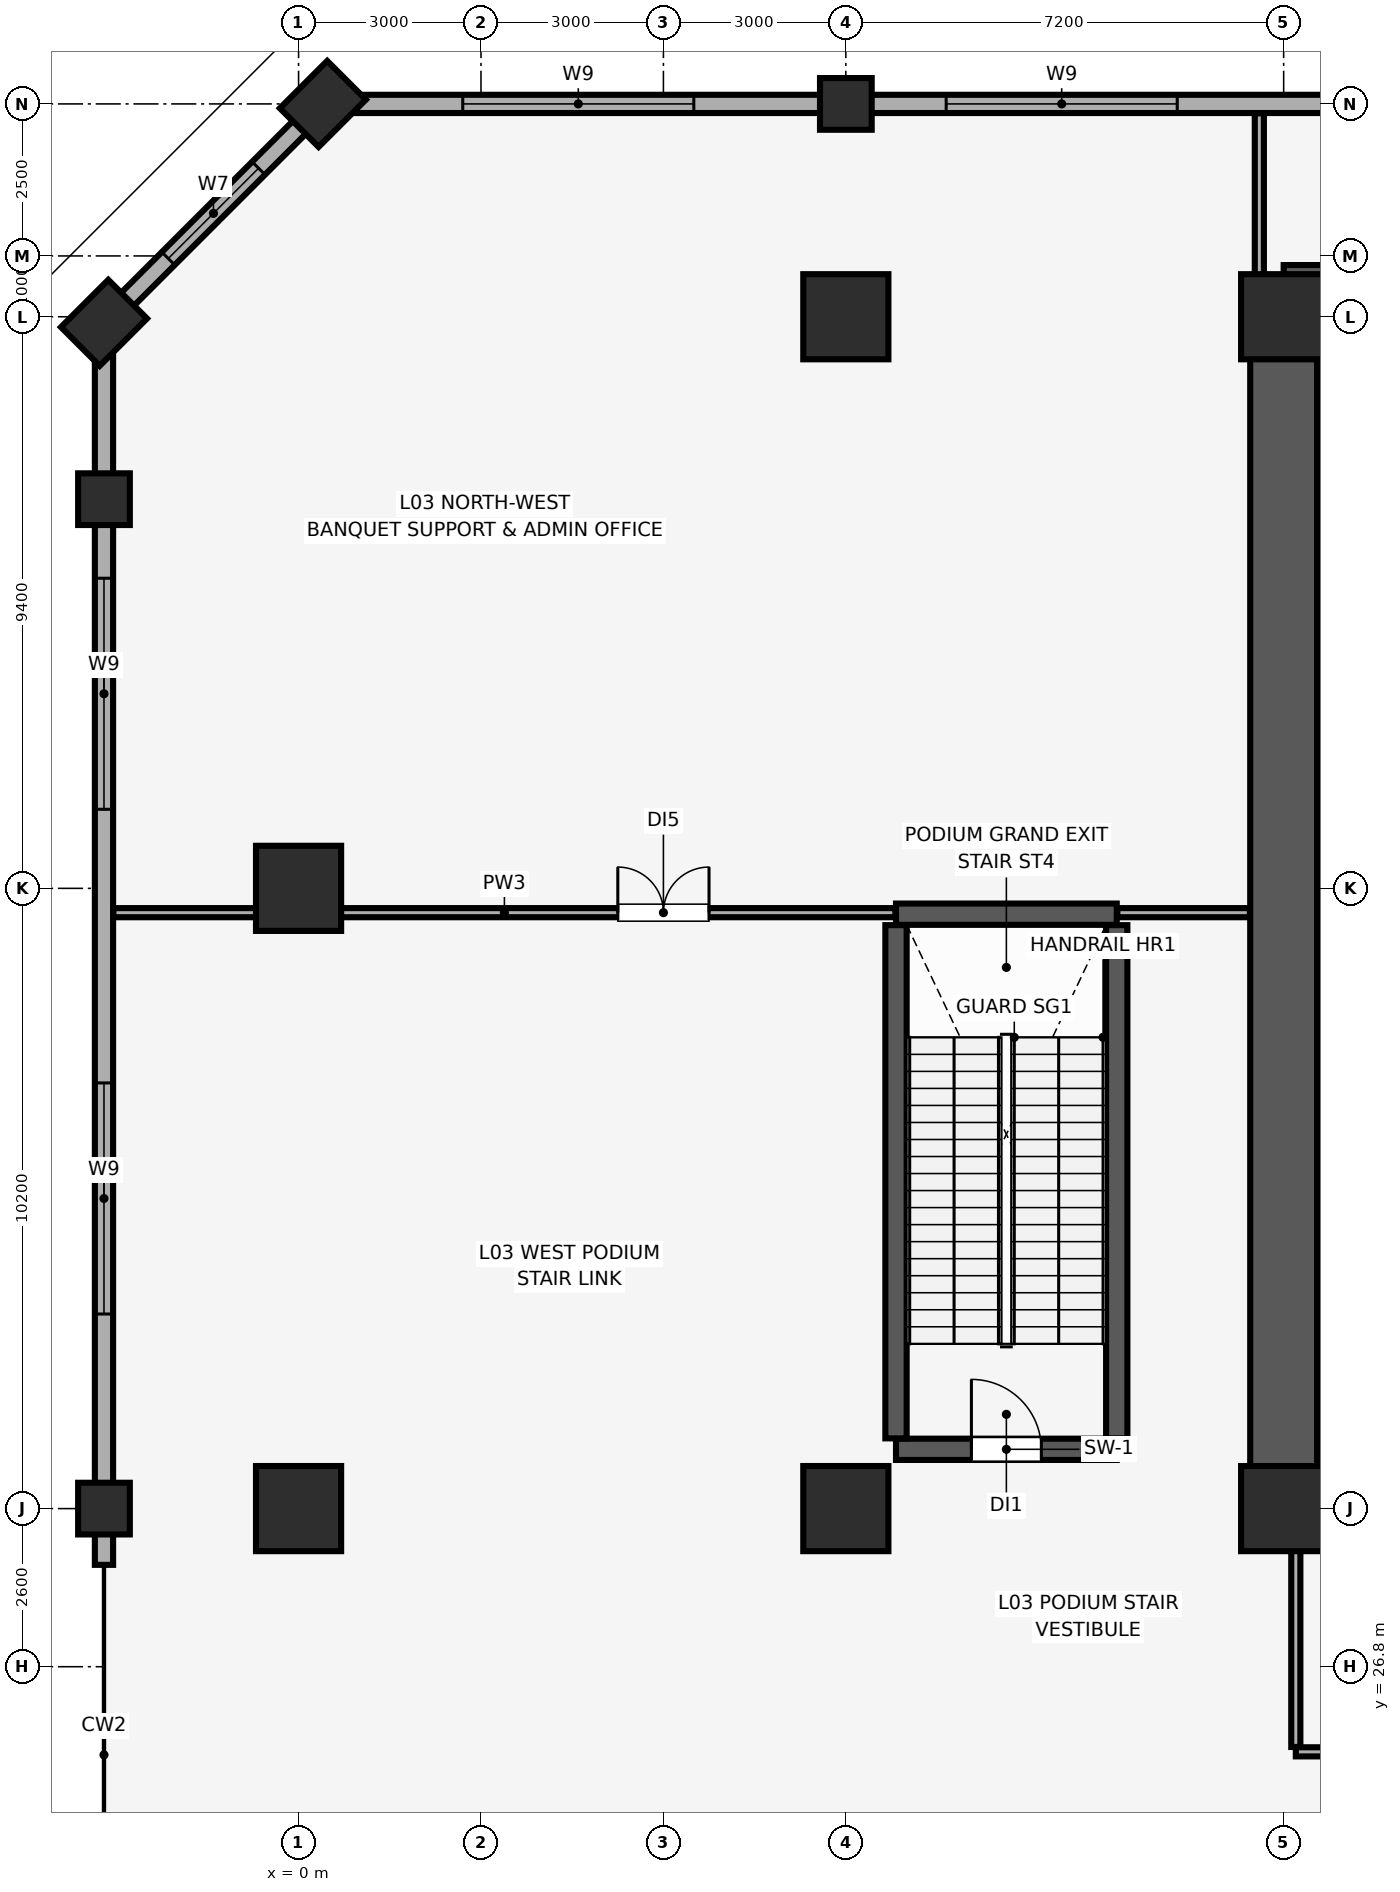
"""IFC4 building model, lengths in metres.
Left out: names, types, materials, properties, quantities, classifications, styles, units other than length and angle.
Written with IfcOpenShell. Run it as: python <this file> out.ifc"""

import sys

from ifc_helpers import new_model, si_unit, direction, frame, frame_2d, origin, origin_2d, place, context, subcontext, project, spatial, rectangle, extrude, element, fill, save


model = new_model("IFC4")
c1 = context("Model", 3, precision=1e-05, world=origin(), true_north=direction((0.0, 1.0)))
c2 = subcontext(c1, "Body", "Model", "MODEL_VIEW")
j1 = project(units=[si_unit("LENGTHUNIT", "METRE"), si_unit("PLANEANGLEUNIT", "RADIAN")], contexts=[c1])
p1 = place(None, origin())
s1 = spatial("IfcSite", under=j1, at=p1, CompositionType="ELEMENT")
p2 = place(p1, origin())
s2 = spatial("IfcBuilding", under=s1, at=p2, CompositionType="ELEMENT")
p3 = place(p2, frame((0.0, 0.0, 19.4)))
s3 = spatial("IfcBuildingStorey", under=s2, at=p3, CompositionType="ELEMENT", Elevation=19.4)
for number, where, z_axis, x_axis in (
    (1, (9.0, 52.5, 0.0), (0.0, 0.0, 1.0), (1.0, 0.0, 0.0)),
    (2, (-3.2, 29.4, 0.0), (0.0, 0.0, 1.0), (1.0, 0.0, 0.0)),
    (3, (-3.2, 46.0, 0.0), (0.0, 0.0, 1.0), (1.0, 0.0, 0.0)),
):
    element("IfcColumn", number, at=place(p3, frame(where, z_axis=z_axis, x_axis=x_axis)), inside=s3, PredefinedType="COLUMN", context=c2, shape_type="SweptSolid", body=[
        extrude(rectangle(XDim=0.85, YDim=0.85, at=origin_2d()), origin(), (0.0, 0.0, 1.0), 6.28),
    ])
for number, where, z_axis, x_axis in (
    (4, (0.4, 52.5, 0.0), (0.0, 0.0, 1.0), (0.707, 0.707, 0.0)),
    (5, (-3.2, 48.9, 0.0), (0.0, 0.0, 1.0), (0.707, 0.707, 0.0)),
):
    element("IfcColumn", number, at=place(p3, frame(where, z_axis=z_axis, x_axis=x_axis)), inside=s3, PredefinedType="PILASTER", context=c2, shape_type="SweptSolid", body=[
        extrude(rectangle(XDim=1.1, YDim=0.9, at=origin_2d()), origin(), (0.0, 0.0, 1.0), 6.28),
    ])
for number, where, z_axis, x_axis in (
    (6, (9.0, 29.4, 0.0), (0.0, 0.0, 1.0), (1.0, 0.0, 0.0)),
    (7, (9.0, 49.0, 0.0), (0.0, 0.0, 1.0), (1.0, 0.0, 0.0)),
    (8, (16.2, 29.4, 0.0), (0.0, 0.0, 1.0), (1.0, 0.0, 0.0)),
    (9, (16.2, 49.0, 0.0), (0.0, 0.0, 1.0), (1.0, 0.0, 0.0)),
    (10, (0.0, 29.4, 0.0), (0.0, 0.0, 1.0), (1.0, 0.0, 0.0)),
    (11, (0.0, 39.6, 0.0), (0.0, 0.0, 1.0), (1.0, 0.0, 0.0)),
):
    element("IfcColumn", number, at=place(p3, frame(where, z_axis=z_axis, x_axis=x_axis)), inside=s3, PredefinedType="COLUMN", context=c2, shape_type="SweptSolid", body=[
        extrude(rectangle(XDim=1.4, YDim=1.4, at=origin_2d()), origin(), (0.0, 0.0, 1.0), 6.28),
    ])
p4 = place(p3, frame((83.6, 52.5, 0.0), z_axis=(0.0, 0.0, 1.0), x_axis=(-1.0, 0.0, 0.0)))
e12 = element("IfcWall", 12, at=p4, inside=s3, PredefinedType="SOLIDWALL", context=c2, shape_type="SweptSolid", body=[
    extrude(rectangle(XDim=83.2, YDim=0.3, at=frame_2d((41.6, 0.0))), origin(), (0.0, 0.0, 1.0), 5.33),
])
p5 = place(p4, frame((77.1, 0.0, 0.85)))
e13 = element("IfcOpeningElement", 13, at=p5, cuts=e12, PredefinedType="OPENING", context=c2, shape_type="SweptSolid", body=[
    extrude(rectangle(XDim=3.8, YDim=2.2, at=frame_2d((1.9, 1.1))), frame((0.0, 0.16, 0.0), z_axis=(0.0, -1.0, 0.0), x_axis=(1.0, 0.0, 0.0)), (0.0, 0.0, 1.0), 0.32),
])
p6 = place(p4, frame((69.15, 0.0, 0.85)))
e14 = element("IfcOpeningElement", 14, at=p6, cuts=e12, PredefinedType="OPENING", context=c2, shape_type="SweptSolid", body=[
    extrude(rectangle(XDim=3.8, YDim=2.2, at=frame_2d((1.9, 1.1))), frame((0.0, 0.16, 0.0), z_axis=(0.0, -1.0, 0.0), x_axis=(1.0, 0.0, 0.0)), (0.0, 0.0, 1.0), 0.32),
])
p7 = place(p4, frame((10.1, 0.0, 0.85)))
e15 = element("IfcOpeningElement", 15, at=p7, cuts=e12, PredefinedType="OPENING", context=c2, shape_type="SweptSolid", body=[
    extrude(rectangle(XDim=3.8, YDim=2.2, at=frame_2d((1.9, 1.1))), frame((0.0, 0.16, 0.0), z_axis=(0.0, -1.0, 0.0), x_axis=(1.0, 0.0, 0.0)), (0.0, 0.0, 1.0), 0.32),
])
p8 = place(p4, frame((2.3, 0.0, 0.85)))
e16 = element("IfcOpeningElement", 16, at=p8, cuts=e12, PredefinedType="OPENING", context=c2, shape_type="SweptSolid", body=[
    extrude(rectangle(XDim=3.8, YDim=2.2, at=frame_2d((1.9, 1.1))), frame((0.0, 0.16, 0.0), z_axis=(0.0, -1.0, 0.0), x_axis=(1.0, 0.0, 0.0)), (0.0, 0.0, 1.0), 0.32),
])
p9 = place(p3, frame((0.4, 52.5, 0.0), z_axis=(0.0, 0.0, 1.0), x_axis=(-0.707082803744, -0.707130757816, 0.0)))
e17 = element("IfcWall", 17, at=p9, inside=s3, PredefinedType="SOLIDWALL", context=c2, shape_type="SweptSolid", body=[
    extrude(rectangle(XDim=5.091, YDim=0.3, at=frame_2d((2.545, 0.0))), origin(), (0.0, 0.0, 1.0), 5.33),
])
p10 = place(p9, frame((1.496, 0.0, 0.85)))
e18 = element("IfcOpeningElement", 18, at=p10, cuts=e17, PredefinedType="OPENING", context=c2, shape_type="SweptSolid", body=[
    extrude(rectangle(XDim=2.1, YDim=1.6, at=frame_2d((1.05, 0.8))), frame((0.0, 0.16, 0.0), z_axis=(0.0, -1.0, 0.0), x_axis=(1.0, 0.0, 0.0)), (0.0, 0.0, 1.0), 0.32),
])
p11 = place(p3, frame((-3.2, 48.9, 0.0), z_axis=(0.0, 0.0, 1.0), x_axis=(0.0, -1.0, 0.0)))
e19 = element("IfcWall", 19, at=p11, inside=s3, PredefinedType="SOLIDWALL", context=c2, shape_type="SweptSolid", body=[
    extrude(rectangle(XDim=20.425, YDim=0.3, at=frame_2d((10.212, 0.0))), origin(), (0.0, 0.0, 1.0), 5.33),
])
p12 = place(p11, frame((12.5, 0.0, 0.85)))
e20 = element("IfcOpeningElement", 20, at=p12, cuts=e19, PredefinedType="OPENING", context=c2, shape_type="SweptSolid", body=[
    extrude(rectangle(XDim=3.8, YDim=2.2, at=frame_2d((1.9, 1.1))), frame((0.0, 0.16, 0.0), z_axis=(0.0, -1.0, 0.0), x_axis=(1.0, 0.0, 0.0)), (0.0, 0.0, 1.0), 0.32),
])
p13 = place(p11, frame((4.2, 0.0, 0.85)))
e21 = element("IfcOpeningElement", 21, at=p13, cuts=e19, PredefinedType="OPENING", context=c2, shape_type="SweptSolid", body=[
    extrude(rectangle(XDim=3.8, YDim=2.2, at=frame_2d((1.9, 1.1))), frame((0.0, 0.16, 0.0), z_axis=(0.0, -1.0, 0.0), x_axis=(1.0, 0.0, 0.0)), (0.0, 0.0, 1.0), 0.32),
])
p14 = place(p3, frame((16.2, 49.3, 0.0), z_axis=(0.0, 0.0, 1.0), x_axis=(1.0, 0.0, 0.0)))
e22 = element("IfcWall", 22, at=p14, inside=s3, PredefinedType="SHEAR", context=c2, shape_type="SweptSolid", body=[
    extrude(rectangle(XDim=51.6, YDim=1.1, at=frame_2d((25.8, 0.0))), origin(), (0.0, 0.0, 1.0), 6.28),
])
p15 = place(p3, frame((16.2, 29.4, 0.0), z_axis=(0.0, 0.0, 1.0), x_axis=(0.0, 1.0, 0.0)))
e23 = element("IfcWall", 23, at=p15, inside=s3, PredefinedType="SHEAR", context=c2, shape_type="SweptSolid", body=[
    extrude(rectangle(XDim=19.2, YDim=1.1, at=frame_2d((9.6, 0.0))), origin(), (0.0, 0.0, 1.0), 6.28),
])
p16 = place(p3, frame((16.755, 29.4, 0.0), z_axis=(0.0, 0.0, 1.0), x_axis=(1.0, 0.0, 0.0)))
e24 = element("IfcWall", 24, at=p16, inside=s3, PredefinedType="SHEAR", context=c2, shape_type="SweptSolid", body=[
    extrude(rectangle(XDim=6.845, YDim=1.1, at=frame_2d((3.423, 0.0))), origin(), (0.0, 0.0, 1.0), 6.28),
])
p17 = place(p3, frame((16.755, 40.025, 0.0), z_axis=(0.0, 0.0, 1.0), x_axis=(1.0, 0.0, 0.0)))
e25 = element("IfcWall", 25, at=p17, inside=s3, PredefinedType="SHEAR", context=c2, shape_type="SweptSolid", body=[
    extrude(rectangle(XDim=4.1, YDim=0.35, at=frame_2d((2.05, 0.0))), origin(), (0.0, 0.0, 1.0), 6.28),
])
p18 = place(p17, frame((1.71, 0.0, 0.0)))
e26 = element("IfcOpeningElement", 26, at=p18, cuts=e25, PredefinedType="OPENING", context=c2, shape_type="SweptSolid", body=[
    extrude(rectangle(XDim=1.15, YDim=2.15, at=frame_2d((0.575, 1.075))), frame((0.0, 0.185, 0.0), z_axis=(0.0, -1.0, 0.0), x_axis=(1.0, 0.0, 0.0)), (0.0, 0.0, 1.0), 0.37),
])
p19 = place(p3, frame((9.825, 30.375, 0.0), z_axis=(0.0, 0.0, 1.0), x_axis=(1.0, 0.0, 0.0)))
e27 = element("IfcWall", 27, at=p19, inside=s3, PredefinedType="SHEAR", context=c2, shape_type="SweptSolid", body=[
    extrude(rectangle(XDim=3.63, YDim=0.35, at=frame_2d((1.815, 0.0))), origin(), (0.0, 0.0, 1.0), 6.28),
])
p20 = place(p19, frame((1.24, 0.0, 0.0)))
e28 = element("IfcOpeningElement", 28, at=p20, cuts=e27, PredefinedType="OPENING", context=c2, shape_type="SweptSolid", body=[
    extrude(rectangle(XDim=1.15, YDim=2.15, at=frame_2d((0.575, 1.075))), frame((0.0, 0.185, 0.0), z_axis=(0.0, -1.0, 0.0), x_axis=(1.0, 0.0, 0.0)), (0.0, 0.0, 1.0), 0.37),
])
p21 = place(p3, frame((9.825, 39.175, 0.0), z_axis=(0.0, 0.0, 1.0), x_axis=(1.0, 0.0, 0.0)))
e29 = element("IfcWall", 29, at=p21, inside=s3, PredefinedType="SHEAR", context=c2, shape_type="SweptSolid", body=[
    extrude(rectangle(XDim=3.63, YDim=0.35, at=frame_2d((1.815, 0.0))), origin(), (0.0, 0.0, 1.0), 6.28),
])
for number, where, z_axis, x_axis in (
    (30, (9.825, 30.555, 0.0), (0.0, 0.0, 1.0), (0.0, 1.0, 0.0)),
    (31, (13.455, 30.555, 0.0), (0.0, 0.0, 1.0), (0.0, 1.0, 0.0)),
):
    element("IfcWall", number, at=place(p3, frame(where, z_axis=z_axis, x_axis=x_axis)), inside=s3, PredefinedType="SHEAR", context=c2, shape_type="SweptSolid", body=[
        extrude(rectangle(XDim=8.44, YDim=0.35, at=frame_2d((4.22, 0.0))), origin(), (0.0, 0.0, 1.0), 6.28),
    ])
p22 = place(p3, frame((-3.045, 39.2, 0.0), z_axis=(0.0, 0.0, 1.0), x_axis=(1.0, 0.0, 0.0)))
e32 = element("IfcWall", 32, at=p22, inside=s3, PredefinedType="PARTITIONING", context=c2, shape_type="SweptSolid", body=[
    extrude(rectangle(XDim=12.86, YDim=0.15, at=frame_2d((6.43, 0.0))), origin(), (0.0, 0.0, 1.0), 6.28),
])
p23 = place(p22, frame((8.295, 0.0, 0.0)))
e33 = element("IfcOpeningElement", 33, at=p23, cuts=e32, PredefinedType="OPENING", context=c2, shape_type="SweptSolid", body=[
    extrude(rectangle(XDim=1.5, YDim=2.25, at=frame_2d((0.75, 1.125))), frame((0.0, 0.085, 0.0), z_axis=(0.0, -1.0, 0.0), x_axis=(1.0, 0.0, 0.0)), (0.0, 0.0, 1.0), 0.17),
])
p24 = place(p3, frame((13.465, 39.2, 0.0), z_axis=(0.0, 0.0, 1.0), x_axis=(1.0, 0.0, 0.0)))
e34 = element("IfcWall", 34, at=p24, inside=s3, PredefinedType="PARTITIONING", context=c2, shape_type="SweptSolid", body=[
    extrude(rectangle(XDim=2.18, YDim=0.15, at=frame_2d((1.09, 0.0))), origin(), (0.0, 0.0, 1.0), 6.28),
])
p25 = place(p3, frame((15.8, 48.61, 0.0), z_axis=(0.0, 0.0, 1.0), x_axis=(0.0, 1.0, 0.0)))
e35 = element("IfcWall", 35, at=p25, inside=s3, PredefinedType="PARTITIONING", context=c2, shape_type="SweptSolid", body=[
    extrude(rectangle(XDim=3.735, YDim=0.15, at=frame_2d((1.867, 0.0))), origin(), (0.0, 0.0, 1.0), 6.28),
])
p26 = place(p3, frame((16.4, 25.4, 0.0), z_axis=(0.0, 0.0, 1.0), x_axis=(1.0, 0.0, 0.0)))
e36 = element("IfcWall", 36, at=p26, inside=s3, PredefinedType="PARTITIONING", context=c2, shape_type="SweptSolid", body=[
    extrude(rectangle(XDim=23.6, YDim=0.15, at=frame_2d((11.8, 0.0))), origin(), (0.0, 0.0, 1.0), 6.28),
])
p27 = place(p26, frame((10.1, 0.0, 0.0)))
e37 = element("IfcOpeningElement", 37, at=p27, cuts=e36, PredefinedType="OPENING", context=c2, shape_type="SweptSolid", body=[
    extrude(rectangle(XDim=1.0, YDim=2.15, at=frame_2d((0.5, 1.075))), frame((0.0, 0.085, 0.0), z_axis=(0.0, -1.0, 0.0), x_axis=(1.0, 0.0, 0.0)), (0.0, 0.0, 1.0), 0.17),
])
p28 = place(p3, frame((16.4, 25.48, 0.0), z_axis=(0.0, 0.0, 1.0), x_axis=(0.0, 1.0, 0.0)))
e38 = element("IfcWall", 38, at=p28, inside=s3, PredefinedType="PARTITIONING", context=c2, shape_type="SweptSolid", body=[
    extrude(rectangle(XDim=3.91, YDim=0.15, at=frame_2d((1.955, 0.0))), origin(), (0.0, 0.0, 1.0), 5.68),
])
p29 = place(p10, origin())
e39 = element("IfcWindow", 39, at=p29, inside=s3, PartitioningType="SINGLE_PANEL", PredefinedType="WINDOW", context=c2, shape_type="SweptSolid", body=[
    extrude(rectangle(XDim=2.1, YDim=1.6, at=frame_2d((1.05, 0.8))), frame((0.0, 0.03, 0.0), z_axis=(0.0, -1.0, 0.0), x_axis=(1.0, 0.0, 0.0)), (0.0, 0.0, 1.0), 0.06),
])
fill(e18, e39)
p30 = place(p12, origin())
e40 = element("IfcWindow", 40, at=p30, inside=s3, PartitioningType="SINGLE_PANEL", PredefinedType="WINDOW", context=c2, shape_type="SweptSolid", body=[
    extrude(rectangle(XDim=3.8, YDim=2.2, at=frame_2d((1.9, 1.1))), frame((0.0, 0.03, 0.0), z_axis=(0.0, -1.0, 0.0), x_axis=(1.0, 0.0, 0.0)), (0.0, 0.0, 1.0), 0.06),
])
fill(e20, e40)
p31 = place(p13, origin())
e41 = element("IfcWindow", 41, at=p31, inside=s3, PartitioningType="SINGLE_PANEL", PredefinedType="WINDOW", context=c2, shape_type="SweptSolid", body=[
    extrude(rectangle(XDim=3.8, YDim=2.2, at=frame_2d((1.9, 1.1))), frame((0.0, 0.03, 0.0), z_axis=(0.0, -1.0, 0.0), x_axis=(1.0, 0.0, 0.0)), (0.0, 0.0, 1.0), 0.06),
])
fill(e21, e41)
p32 = place(p5, origin())
e42 = element("IfcWindow", 42, at=p32, inside=s3, PartitioningType="SINGLE_PANEL", PredefinedType="WINDOW", context=c2, shape_type="SweptSolid", body=[
    extrude(rectangle(XDim=3.8, YDim=2.2, at=frame_2d((1.9, 1.1))), frame((0.0, 0.03, 0.0), z_axis=(0.0, -1.0, 0.0), x_axis=(1.0, 0.0, 0.0)), (0.0, 0.0, 1.0), 0.06),
])
fill(e13, e42)
p33 = place(p6, origin())
e43 = element("IfcWindow", 43, at=p33, inside=s3, PartitioningType="SINGLE_PANEL", PredefinedType="WINDOW", context=c2, shape_type="SweptSolid", body=[
    extrude(rectangle(XDim=3.8, YDim=2.2, at=frame_2d((1.9, 1.1))), frame((0.0, 0.03, 0.0), z_axis=(0.0, -1.0, 0.0), x_axis=(1.0, 0.0, 0.0)), (0.0, 0.0, 1.0), 0.06),
])
fill(e14, e43)
p34 = place(p20, origin())
e44 = element("IfcDoor", 44, at=p34, inside=s3, OperationType="SINGLE_SWING_LEFT", PredefinedType="DOOR", context=c2, shape_type="SweptSolid", body=[
    extrude(rectangle(XDim=1.15, YDim=2.15, at=frame_2d((0.575, 1.075))), frame((0.0, 0.025, 0.0), z_axis=(0.0, -1.0, 0.0), x_axis=(1.0, 0.0, 0.0)), (0.0, 0.0, 1.0), 0.05),
])
fill(e28, e44)
p35 = place(p23, origin())
e45 = element("IfcDoor", 45, at=p35, inside=s3, OperationType="DOUBLE_DOOR_SINGLE_SWING", PredefinedType="DOOR", context=c2, shape_type="SweptSolid", body=[
    extrude(rectangle(XDim=1.5, YDim=2.25, at=frame_2d((0.75, 1.125))), frame((0.0, 0.025, 0.0), z_axis=(0.0, -1.0, 0.0), x_axis=(1.0, 0.0, 0.0)), (0.0, 0.0, 1.0), 0.05),
])
fill(e33, e45)
save(model, sys.argv[1])
